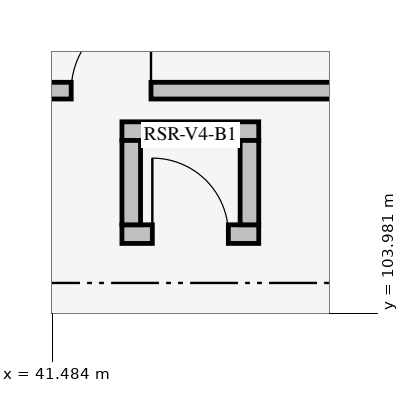
"""IFC4 building model, lengths in metres.
Left out: names, types, materials, properties, quantities, classifications, styles, units other than length and angle.
Written with IfcOpenShell. Run it as: python <this file> out.ifc"""

import sys

from ifc_helpers import new_model, si_unit, direction, frame, frame_2d, origin, place, context, subcontext, project, spatial, rectangle, extrude, element, fill, save


model = new_model("IFC4")
c1 = context("Model", 3, precision=1e-05, world=origin(), true_north=direction((0.0, 1.0)))
c2 = subcontext(c1, "Body", "Model", "MODEL_VIEW")
j1 = project(units=[si_unit("LENGTHUNIT", "METRE"), si_unit("PLANEANGLEUNIT", "RADIAN")], contexts=[c1])
p1 = place(None, origin())
s1 = spatial("IfcSite", under=j1, at=p1, CompositionType="ELEMENT")
p2 = place(p1, origin())
s2 = spatial("IfcBuilding", under=s1, at=p2, CompositionType="ELEMENT")
p3 = place(p2, frame((0.0, 0.0, -5.2)))
s3 = spatial("IfcBuildingStorey", under=s2, at=p3, CompositionType="ELEMENT", Elevation=-5.2)
p4 = place(p3, frame((42.4, 105.022, 0.0), z_axis=(0.0, 0.0, 1.0), x_axis=(1.0, 0.0, 0.0)))
e1 = element("IfcWall", 1, at=p4, inside=s3, PredefinedType="SOLIDWALL", context=c2, shape_type="SweptSolid", body=[
    extrude(rectangle(XDim=1.8, YDim=0.245, at=frame_2d((0.9, 0.0))), origin(), (0.0, 0.0, 1.0), 4.925),
])
p5 = place(p4, frame((0.4, 0.0, 0.0)))
e2 = element("IfcOpeningElement", 2, at=p5, cuts=e1, PredefinedType="OPENING", context=c2, shape_type="SweptSolid", body=[
    extrude(rectangle(XDim=1.0, YDim=2.2, at=frame_2d((0.5, 1.1))), frame((0.0, 0.135, 0.0), z_axis=(0.0, -1.0, 0.0), x_axis=(1.0, 0.0, 0.0)), (0.0, 0.0, 1.0), 0.269),
])
p6 = place(p3, frame((42.4, 106.377, 0.0), z_axis=(0.0, 0.0, 1.0), x_axis=(1.0, 0.0, 0.0)))
e3 = element("IfcWall", 3, at=p6, inside=s3, PredefinedType="SOLIDWALL", context=c2, shape_type="SweptSolid", body=[
    extrude(rectangle(XDim=1.8, YDim=0.245, at=frame_2d((0.9, 0.0))), origin(), (0.0, 0.0, 1.0), 4.925),
])
for number, where, z_axis, x_axis in (
    (4, (44.077, 105.145, 0.0), (0.0, 0.0, 1.0), (0.0, 1.0, 0.0)),
    (5, (42.522, 105.145, 0.0), (0.0, 0.0, 1.0), (0.0, 1.0, 0.0)),
):
    element("IfcWall", number, at=place(p3, frame(where, z_axis=z_axis, x_axis=x_axis)), inside=s3, PredefinedType="SOLIDWALL", context=c2, shape_type="SweptSolid", body=[
        extrude(rectangle(XDim=1.11, YDim=0.245, at=frame_2d((0.555, 0.0))), origin(), (0.0, 0.0, 1.0), 4.925),
    ])
p7 = place(p3, frame((38.44, 106.91, 0.0), z_axis=(0.0, 0.0, 1.0), x_axis=(1.0, 0.0, 0.0)))
e6 = element("IfcWall", 6, at=p7, inside=s3, PredefinedType="PLUMBINGWALL", context=c2, shape_type="SweptSolid", body=[
    extrude(rectangle(XDim=13.12, YDim=0.22, at=frame_2d((6.56, 0.0))), origin(), (0.0, 0.0, 1.0), 4.925),
])
p8 = place(p7, frame((3.292, 0.0, 0.0)))
e7 = element("IfcOpeningElement", 7, at=p8, cuts=e6, PredefinedType="OPENING", context=c2, shape_type="SweptSolid", body=[
    extrude(rectangle(XDim=1.05, YDim=2.15, at=frame_2d((0.525, 1.075))), frame((0.0, 0.122, 0.0), z_axis=(0.0, -1.0, 0.0), x_axis=(1.0, 0.0, 0.0)), (0.0, 0.0, 1.0), 0.244),
])
p9 = place(p5, origin())
e8 = element("IfcDoor", 8, at=p9, inside=s3, OperationType="SINGLE_SWING_LEFT", PredefinedType="DOOR", context=c2, shape_type="SweptSolid", body=[
    extrude(rectangle(XDim=1.0, YDim=2.2, at=frame_2d((0.5, 1.1))), frame((0.0, 0.025, 0.0), z_axis=(0.0, -1.0, 0.0), x_axis=(1.0, 0.0, 0.0)), (0.0, 0.0, 1.0), 0.05),
])
fill(e2, e8)
p10 = place(p8, origin())
e9 = element("IfcDoor", 9, at=p10, inside=s3, OperationType="SINGLE_SWING_RIGHT", PredefinedType="DOOR", context=c2, shape_type="SweptSolid", body=[
    extrude(rectangle(XDim=1.05, YDim=2.15, at=frame_2d((0.525, 1.075))), frame((0.0, 0.025, 0.0), z_axis=(0.0, -1.0, 0.0), x_axis=(1.0, 0.0, 0.0)), (0.0, 0.0, 1.0), 0.05),
])
fill(e7, e9)
save(model, sys.argv[1])
